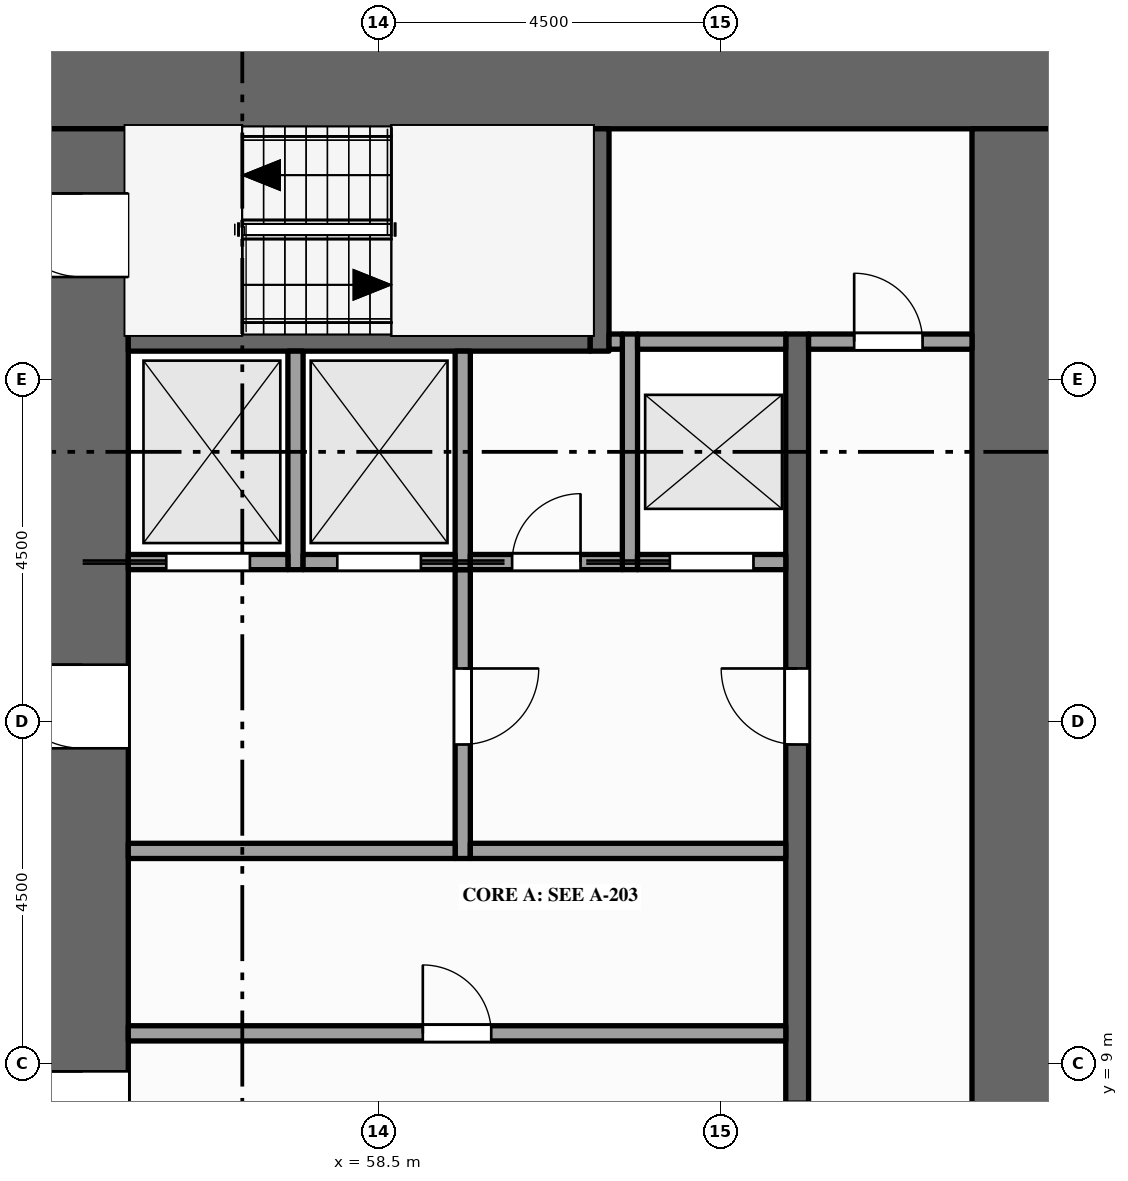
"""IFC4 building model, lengths in metres.
Left out: names, types, materials, properties, quantities, classifications, styles, units other than length and angle.
Written with IfcOpenShell. Run it as: python <this file> out.ifc"""

import sys

from ifc_helpers import new_model, si_unit, direction, frame, frame_2d, origin, place, context, subcontext, project, spatial, rectangle, extrude, element, fill, save


model = new_model("IFC4")
c1 = context("Model", 3, precision=1e-05, world=origin(), true_north=direction((0.0, 1.0)))
c2 = subcontext(c1, "Body", "Model", "MODEL_VIEW")
j1 = project(units=[si_unit("LENGTHUNIT", "METRE"), si_unit("PLANEANGLEUNIT", "RADIAN")], contexts=[c1])
p1 = place(None, origin())
s1 = spatial("IfcSite", under=j1, at=p1, CompositionType="ELEMENT")
p2 = place(p1, origin())
s2 = spatial("IfcBuilding", under=s1, at=p2, CompositionType="ELEMENT")
p3 = place(p2, frame((0.0, 0.0, 14.0)))
s3 = spatial("IfcBuildingStorey", under=s2, at=p3, CompositionType="ELEMENT", Elevation=14.0)
p4 = place(p3, frame((54.0, 21.9, -0.15), z_axis=(0.0, 0.0, 1.0), x_axis=(1.0, 0.0, 0.0)))
e1 = element("IfcWall", 1, at=p4, inside=s3, PredefinedType="SHEAR", context=c2, shape_type="SweptSolid", body=[
    extrude(rectangle(XDim=13.5, YDim=1.2, at=frame_2d((6.75, 0.0))), origin(), (0.0, 0.0, 1.0), 5.0),
])
p5 = place(p3, frame((54.6, 1.2, -0.15), z_axis=(0.0, 0.0, 1.0), x_axis=(0.0, 1.0, 0.0)))
e2 = element("IfcWall", 2, at=p5, inside=s3, PredefinedType="SHEAR", context=c2, shape_type="SweptSolid", body=[
    extrude(rectangle(XDim=20.1, YDim=1.2, at=frame_2d((10.05, 0.0))), origin(), (0.0, 0.0, 1.0), 5.0),
])
p6 = place(p5, frame((5.9, 0.0, 0.15)))
e3 = element("IfcOpeningElement", 3, at=p6, cuts=e2, PredefinedType="OPENING", context=c2, shape_type="SweptSolid", body=[
    extrude(rectangle(XDim=1.8, YDim=2.1, at=frame_2d((0.9, 1.05))), frame((0.0, 0.61, 0.0), z_axis=(0.0, -1.0, 0.0), x_axis=(1.0, 0.0, 0.0)), (0.0, 0.0, 1.0), 1.22),
])
p7 = place(p5, frame((11.95, 0.0, 0.15)))
e4 = element("IfcOpeningElement", 4, at=p7, cuts=e2, PredefinedType="OPENING", context=c2, shape_type="SweptSolid", body=[
    extrude(rectangle(XDim=1.1, YDim=2.1, at=frame_2d((0.55, 1.05))), frame((0.0, 0.61, 0.0), z_axis=(0.0, -1.0, 0.0), x_axis=(1.0, 0.0, 0.0)), (0.0, 0.0, 1.0), 1.22),
])
p8 = place(p5, frame((0.95, 0.0, 0.15)))
e5 = element("IfcOpeningElement", 5, at=p8, cuts=e2, PredefinedType="OPENING", context=c2, shape_type="SweptSolid", body=[
    extrude(rectangle(XDim=1.1, YDim=2.1, at=frame_2d((0.55, 1.05))), frame((0.0, 0.61, 0.0), z_axis=(0.0, -1.0, 0.0), x_axis=(1.0, 0.0, 0.0)), (0.0, 0.0, 1.0), 1.22),
])
p9 = place(p5, frame((18.15, 0.0, 0.15)))
e6 = element("IfcOpeningElement", 6, at=p9, cuts=e2, PredefinedType="OPENING", context=c2, shape_type="SweptSolid", body=[
    extrude(rectangle(XDim=1.1, YDim=2.1, at=frame_2d((0.55, 1.05))), frame((0.0, 0.61, 0.0), z_axis=(0.0, -1.0, 0.0), x_axis=(1.0, 0.0, 0.0)), (0.0, 0.0, 1.0), 1.22),
])
p10 = place(p3, frame((66.9, 1.2, -0.15), z_axis=(0.0, 0.0, 1.0), x_axis=(0.0, 1.0, 0.0)))
e7 = element("IfcWall", 7, at=p10, inside=s3, PredefinedType="SHEAR", context=c2, shape_type="SweptSolid", body=[
    extrude(rectangle(XDim=20.1, YDim=1.2, at=frame_2d((10.05, 0.0))), origin(), (0.0, 0.0, 1.0), 5.0),
])
p11 = place(p3, frame((57.4, 15.5, 0.0), z_axis=(0.0, 0.0, 1.0), x_axis=(0.0, 1.0, 0.0)))
e8 = element("IfcWall", 8, at=p11, inside=s3, PredefinedType="SOLIDWALL", context=c2, shape_type="SweptSolid", body=[
    extrude(rectangle(XDim=2.875, YDim=0.2, at=frame_2d((1.438, 0.0))), origin(), (0.0, 0.0, 1.0), 4.75),
])
p12 = place(p3, frame((59.6, 11.7, 0.0), z_axis=(0.0, 0.0, 1.0), x_axis=(0.0, 1.0, 0.0)))
e9 = element("IfcWall", 9, at=p12, inside=s3, PredefinedType="PARTITIONING", context=c2, shape_type="SweptSolid", body=[
    extrude(rectangle(XDim=3.8, YDim=0.2, at=frame_2d((1.9, 0.0))), origin(), (0.0, 0.0, 1.0), 4.75),
])
p13 = place(p12, frame((1.5, 0.0, 0.0)))
e10 = element("IfcOpeningElement", 10, at=p13, cuts=e9, PredefinedType="OPENING", context=c2, shape_type="SweptSolid", body=[
    extrude(rectangle(XDim=1.0, YDim=2.1, at=frame_2d((0.5, 1.05))), frame((0.0, 0.11, 0.0), z_axis=(0.0, -1.0, 0.0), x_axis=(1.0, 0.0, 0.0)), (0.0, 0.0, 1.0), 0.22),
])
p14 = place(p3, frame((59.6, 15.5, 0.0), z_axis=(0.0, 0.0, 1.0), x_axis=(0.0, 1.0, 0.0)))
e11 = element("IfcWall", 11, at=p14, inside=s3, PredefinedType="SOLIDWALL", context=c2, shape_type="SweptSolid", body=[
    extrude(rectangle(XDim=2.875, YDim=0.2, at=frame_2d((1.438, 0.0))), origin(), (0.0, 0.0, 1.0), 4.75),
])
p15 = place(p3, frame((61.4, 18.375, 0.0), z_axis=(0.0, 0.0, 1.0), x_axis=(0.0, 1.0, 0.0)))
e12 = element("IfcWall", 12, at=p15, inside=s3, PredefinedType="SHEAR", context=c2, shape_type="SweptSolid", body=[
    extrude(rectangle(XDim=2.925, YDim=0.25, at=frame_2d((1.462, 0.0))), origin(), (0.0, 0.0, 1.0), 4.75),
])
p16 = place(p3, frame((61.8, 15.5, 0.0), z_axis=(0.0, 0.0, 1.0), x_axis=(0.0, 1.0, 0.0)))
e13 = element("IfcWall", 13, at=p16, inside=s3, PredefinedType="SOLIDWALL", context=c2, shape_type="SweptSolid", body=[
    extrude(rectangle(XDim=3.1, YDim=0.2, at=frame_2d((1.55, 0.0))), origin(), (0.0, 0.0, 1.0), 4.75),
])
p17 = place(p3, frame((64.0, 4.1, 0.0), z_axis=(0.0, 0.0, 1.0), x_axis=(0.0, 1.0, 0.0)))
e14 = element("IfcWall", 14, at=p17, inside=s3, PredefinedType="SHEAR", context=c2, shape_type="SweptSolid", body=[
    extrude(rectangle(XDim=14.5, YDim=0.3, at=frame_2d((7.25, 0.0))), origin(), (0.0, 0.0, 1.0), 4.75),
])
p18 = place(p17, frame((3.4, 0.0, 0.0)))
e15 = element("IfcOpeningElement", 15, at=p18, cuts=e14, PredefinedType="OPENING", context=c2, shape_type="SweptSolid", body=[
    extrude(rectangle(XDim=1.0, YDim=2.1, at=frame_2d((0.5, 1.05))), frame((0.0, 0.16, 0.0), z_axis=(0.0, -1.0, 0.0), x_axis=(1.0, 0.0, 0.0)), (0.0, 0.0, 1.0), 0.32),
])
p19 = place(p17, frame((9.1, 0.0, 0.0)))
e16 = element("IfcOpeningElement", 16, at=p19, cuts=e14, PredefinedType="OPENING", context=c2, shape_type="SweptSolid", body=[
    extrude(rectangle(XDim=1.0, YDim=2.1, at=frame_2d((0.5, 1.05))), frame((0.0, 0.16, 0.0), z_axis=(0.0, -1.0, 0.0), x_axis=(1.0, 0.0, 0.0)), (0.0, 0.0, 1.0), 0.32),
])
p20 = place(p3, frame((55.2, 9.4, 0.0), z_axis=(0.0, 0.0, 1.0), x_axis=(1.0, 0.0, 0.0)))
e17 = element("IfcWall", 17, at=p20, inside=s3, PredefinedType="PARTITIONING", context=c2, shape_type="SweptSolid", body=[
    extrude(rectangle(XDim=8.65, YDim=0.2, at=frame_2d((4.325, 0.0))), origin(), (0.0, 0.0, 1.0), 4.75),
])
p21 = place(p20, frame((3.875, 0.0, 0.0)))
e18 = element("IfcOpeningElement", 18, at=p21, cuts=e17, PredefinedType="OPENING", context=c2, shape_type="SweptSolid", body=[
    extrude(rectangle(XDim=0.9, YDim=2.1, at=frame_2d((0.45, 1.05))), frame((0.0, 0.11, 0.0), z_axis=(0.0, -1.0, 0.0), x_axis=(1.0, 0.0, 0.0)), (0.0, 0.0, 1.0), 0.22),
])
p22 = place(p3, frame((55.2, 11.8, 0.0), z_axis=(0.0, 0.0, 1.0), x_axis=(1.0, 0.0, 0.0)))
e19 = element("IfcWall", 19, at=p22, inside=s3, PredefinedType="PARTITIONING", context=c2, shape_type="SweptSolid", body=[
    extrude(rectangle(XDim=4.3, YDim=0.2, at=frame_2d((2.15, 0.0))), origin(), (0.0, 0.0, 1.0), 4.75),
])
p23 = place(p3, frame((59.7, 11.8, 0.0), z_axis=(0.0, 0.0, 1.0), x_axis=(1.0, 0.0, 0.0)))
e20 = element("IfcWall", 20, at=p23, inside=s3, PredefinedType="PARTITIONING", context=c2, shape_type="SweptSolid", body=[
    extrude(rectangle(XDim=4.15, YDim=0.2, at=frame_2d((2.075, 0.0))), origin(), (0.0, 0.0, 1.0), 4.75),
])
p24 = place(p3, frame((55.2, 15.6, 0.0), z_axis=(0.0, 0.0, 1.0), x_axis=(1.0, 0.0, 0.0)))
e21 = element("IfcWall", 21, at=p24, inside=s3, PredefinedType="SOLIDWALL", context=c2, shape_type="SweptSolid", body=[
    extrude(rectangle(XDim=2.1, YDim=0.2, at=frame_2d((1.05, 0.0))), origin(), (0.0, 0.0, 1.0), 4.75),
])
p25 = place(p24, frame((0.5, 0.0, 0.012)))
e22 = element("IfcOpeningElement", 22, at=p25, cuts=e21, PredefinedType="OPENING", context=c2, shape_type="SweptSolid", body=[
    extrude(rectangle(XDim=1.1, YDim=2.1, at=frame_2d((0.55, 1.05))), frame((0.0, 0.11, 0.0), z_axis=(0.0, -1.0, 0.0), x_axis=(1.0, 0.0, 0.0)), (0.0, 0.0, 1.0), 0.22),
])
p26 = place(p3, frame((57.5, 15.6, 0.0), z_axis=(0.0, 0.0, 1.0), x_axis=(1.0, 0.0, 0.0)))
e23 = element("IfcWall", 23, at=p26, inside=s3, PredefinedType="SOLIDWALL", context=c2, shape_type="SweptSolid", body=[
    extrude(rectangle(XDim=2.0, YDim=0.2, at=frame_2d((1.0, 0.0))), origin(), (0.0, 0.0, 1.0), 4.75),
])
p27 = place(p26, frame((0.45, 0.0, 0.012)))
e24 = element("IfcOpeningElement", 24, at=p27, cuts=e23, PredefinedType="OPENING", context=c2, shape_type="SweptSolid", body=[
    extrude(rectangle(XDim=1.1, YDim=2.1, at=frame_2d((0.55, 1.05))), frame((0.0, 0.11, 0.0), z_axis=(0.0, -1.0, 0.0), x_axis=(1.0, 0.0, 0.0)), (0.0, 0.0, 1.0), 0.22),
])
p28 = place(p3, frame((59.7, 15.6, 0.0), z_axis=(0.0, 0.0, 1.0), x_axis=(1.0, 0.0, 0.0)))
e25 = element("IfcWall", 25, at=p28, inside=s3, PredefinedType="PARTITIONING", context=c2, shape_type="SweptSolid", body=[
    extrude(rectangle(XDim=2.0, YDim=0.2, at=frame_2d((1.0, 0.0))), origin(), (0.0, 0.0, 1.0), 4.75),
])
p29 = place(p28, frame((0.55, 0.0, 0.0)))
e26 = element("IfcOpeningElement", 26, at=p29, cuts=e25, PredefinedType="OPENING", context=c2, shape_type="SweptSolid", body=[
    extrude(rectangle(XDim=0.9, YDim=2.1, at=frame_2d((0.45, 1.05))), frame((0.0, 0.11, 0.0), z_axis=(0.0, -1.0, 0.0), x_axis=(1.0, 0.0, 0.0)), (0.0, 0.0, 1.0), 0.22),
])
p30 = place(p3, frame((61.9, 15.6, 0.0), z_axis=(0.0, 0.0, 1.0), x_axis=(1.0, 0.0, 0.0)))
e27 = element("IfcWall", 27, at=p30, inside=s3, PredefinedType="SOLIDWALL", context=c2, shape_type="SweptSolid", body=[
    extrude(rectangle(XDim=1.95, YDim=0.2, at=frame_2d((0.975, 0.0))), origin(), (0.0, 0.0, 1.0), 4.75),
])
p31 = place(p30, frame((0.425, 0.0, 0.012)))
e28 = element("IfcOpeningElement", 28, at=p31, cuts=e27, PredefinedType="OPENING", context=c2, shape_type="SweptSolid", body=[
    extrude(rectangle(XDim=1.1, YDim=2.1, at=frame_2d((0.55, 1.05))), frame((0.0, 0.11, 0.0), z_axis=(0.0, -1.0, 0.0), x_axis=(1.0, 0.0, 0.0)), (0.0, 0.0, 1.0), 0.22),
])
p32 = place(p3, frame((55.2, 18.5, 0.0), z_axis=(0.0, 0.0, 1.0), x_axis=(1.0, 0.0, 0.0)))
e29 = element("IfcWall", 29, at=p32, inside=s3, PredefinedType="SHEAR", context=c2, shape_type="SweptSolid", body=[
    extrude(rectangle(XDim=6.075, YDim=0.25, at=frame_2d((3.038, 0.0))), origin(), (0.0, 0.0, 1.0), 4.75),
])
p33 = place(p3, frame((61.525, 18.5, 0.0), z_axis=(0.0, 0.0, 1.0), x_axis=(1.0, 0.0, 0.0)))
e30 = element("IfcWall", 30, at=p33, inside=s3, PredefinedType="PARTITIONING", context=c2, shape_type="SweptSolid", body=[
    extrude(rectangle(XDim=0.175, YDim=0.2, at=frame_2d((0.087, 0.0))), origin(), (0.0, 0.0, 1.0), 4.75),
])
p34 = place(p3, frame((61.9, 18.5, 0.0), z_axis=(0.0, 0.0, 1.0), x_axis=(1.0, 0.0, 0.0)))
e31 = element("IfcWall", 31, at=p34, inside=s3, PredefinedType="SOLIDWALL", context=c2, shape_type="SweptSolid", body=[
    extrude(rectangle(XDim=1.95, YDim=0.2, at=frame_2d((0.975, 0.0))), origin(), (0.0, 0.0, 1.0), 4.75),
])
p35 = place(p3, frame((64.15, 18.5, 0.0), z_axis=(0.0, 0.0, 1.0), x_axis=(1.0, 0.0, 0.0)))
e32 = element("IfcWall", 32, at=p35, inside=s3, PredefinedType="PARTITIONING", context=c2, shape_type="SweptSolid", body=[
    extrude(rectangle(XDim=2.15, YDim=0.2, at=frame_2d((1.075, 0.0))), origin(), (0.0, 0.0, 1.0), 4.75),
])
p36 = place(p35, frame((0.6, 0.0, 0.0)))
e33 = element("IfcOpeningElement", 33, at=p36, cuts=e32, PredefinedType="OPENING", context=c2, shape_type="SweptSolid", body=[
    extrude(rectangle(XDim=0.9, YDim=2.1, at=frame_2d((0.45, 1.05))), frame((0.0, 0.11, 0.0), z_axis=(0.0, -1.0, 0.0), x_axis=(1.0, 0.0, 0.0)), (0.0, 0.0, 1.0), 0.22),
])
p37 = place(p25, origin())
e34 = element("IfcDoor", 34, at=p37, inside=s3, OperationType="SLIDING_TO_LEFT", PredefinedType="DOOR", context=c2, shape_type="SweptSolid", body=[
    extrude(rectangle(XDim=1.1, YDim=2.1, at=frame_2d((0.55, 1.05))), frame((0.0, 0.025, 0.0), z_axis=(0.0, -1.0, 0.0), x_axis=(1.0, 0.0, 0.0)), (0.0, 0.0, 1.0), 0.05),
])
fill(e22, e34)
p38 = place(p27, origin())
e35 = element("IfcDoor", 35, at=p38, inside=s3, OperationType="SLIDING_TO_RIGHT", PredefinedType="DOOR", context=c2, shape_type="SweptSolid", body=[
    extrude(rectangle(XDim=1.1, YDim=2.1, at=frame_2d((0.55, 1.05))), frame((0.0, 0.025, 0.0), z_axis=(0.0, -1.0, 0.0), x_axis=(1.0, 0.0, 0.0)), (0.0, 0.0, 1.0), 0.05),
])
fill(e24, e35)
p39 = place(p31, origin())
e36 = element("IfcDoor", 36, at=p39, inside=s3, OperationType="SLIDING_TO_LEFT", PredefinedType="DOOR", context=c2, shape_type="SweptSolid", body=[
    extrude(rectangle(XDim=1.1, YDim=2.1, at=frame_2d((0.55, 1.05))), frame((0.0, 0.025, 0.0), z_axis=(0.0, -1.0, 0.0), x_axis=(1.0, 0.0, 0.0)), (0.0, 0.0, 1.0), 0.05),
])
fill(e28, e36)
p40 = place(p6, origin())
e37 = element("IfcDoor", 37, at=p40, inside=s3, OperationType="DOUBLE_DOOR_SINGLE_SWING", PredefinedType="DOOR", context=c2, shape_type="SweptSolid", body=[
    extrude(rectangle(XDim=1.8, YDim=2.1, at=frame_2d((0.9, 1.05))), frame((0.0, 0.025, 0.0), z_axis=(0.0, -1.0, 0.0), x_axis=(1.0, 0.0, 0.0)), (0.0, 0.0, 1.0), 0.05),
])
fill(e3, e37)
p41 = place(p7, origin())
e38 = element("IfcDoor", 38, at=p41, inside=s3, OperationType="SINGLE_SWING_RIGHT", PredefinedType="DOOR", context=c2, shape_type="SweptSolid", body=[
    extrude(rectangle(XDim=1.1, YDim=2.1, at=frame_2d((0.55, 1.05))), frame((0.0, 0.025, 0.0), z_axis=(0.0, -1.0, 0.0), x_axis=(1.0, 0.0, 0.0)), (0.0, 0.0, 1.0), 0.05),
])
fill(e4, e38)
p42 = place(p13, origin())
e39 = element("IfcDoor", 39, at=p42, inside=s3, OperationType="SINGLE_SWING_RIGHT", PredefinedType="DOOR", context=c2, shape_type="SweptSolid", body=[
    extrude(rectangle(XDim=1.0, YDim=2.1, at=frame_2d((0.5, 1.05))), frame((0.0, 0.025, 0.0), z_axis=(0.0, -1.0, 0.0), x_axis=(1.0, 0.0, 0.0)), (0.0, 0.0, 1.0), 0.05),
])
fill(e10, e39)
p43 = place(p19, origin())
e40 = element("IfcDoor", 40, at=p43, inside=s3, OperationType="SINGLE_SWING_RIGHT", PredefinedType="DOOR", context=c2, shape_type="SweptSolid", body=[
    extrude(rectangle(XDim=1.0, YDim=2.1, at=frame_2d((0.5, 1.05))), frame((0.0, 0.025, 0.0), z_axis=(0.0, -1.0, 0.0), x_axis=(1.0, 0.0, 0.0)), (0.0, 0.0, 1.0), 0.05),
])
fill(e16, e40)
p44 = place(p9, origin())
e41 = element("IfcDoor", 41, at=p44, inside=s3, OperationType="SINGLE_SWING_RIGHT", PredefinedType="DOOR", context=c2, shape_type="SweptSolid", body=[
    extrude(rectangle(XDim=1.1, YDim=2.1, at=frame_2d((0.55, 1.05))), frame((0.0, 0.025, 0.0), z_axis=(0.0, -1.0, 0.0), x_axis=(1.0, 0.0, 0.0)), (0.0, 0.0, 1.0), 0.05),
])
fill(e6, e41)
p45 = place(p36, origin())
e42 = element("IfcDoor", 42, at=p45, inside=s3, OperationType="SINGLE_SWING_LEFT", PredefinedType="DOOR", context=c2, shape_type="SweptSolid", body=[
    extrude(rectangle(XDim=0.9, YDim=2.1, at=frame_2d((0.45, 1.05))), frame((0.0, 0.025, 0.0), z_axis=(0.0, -1.0, 0.0), x_axis=(1.0, 0.0, 0.0)), (0.0, 0.0, 1.0), 0.05),
])
fill(e33, e42)
p46 = place(p21, origin())
e43 = element("IfcDoor", 43, at=p46, inside=s3, OperationType="SINGLE_SWING_LEFT", PredefinedType="DOOR", context=c2, shape_type="SweptSolid", body=[
    extrude(rectangle(XDim=0.9, YDim=2.1, at=frame_2d((0.45, 1.05))), frame((0.0, 0.025, 0.0), z_axis=(0.0, -1.0, 0.0), x_axis=(1.0, 0.0, 0.0)), (0.0, 0.0, 1.0), 0.05),
])
fill(e18, e43)
p47 = place(p29, origin())
e44 = element("IfcDoor", 44, at=p47, inside=s3, OperationType="SINGLE_SWING_RIGHT", PredefinedType="DOOR", context=c2, shape_type="SweptSolid", body=[
    extrude(rectangle(XDim=0.9, YDim=2.1, at=frame_2d((0.45, 1.05))), frame((0.0, 0.025, 0.0), z_axis=(0.0, -1.0, 0.0), x_axis=(1.0, 0.0, 0.0)), (0.0, 0.0, 1.0), 0.05),
])
fill(e26, e44)
save(model, sys.argv[1])
